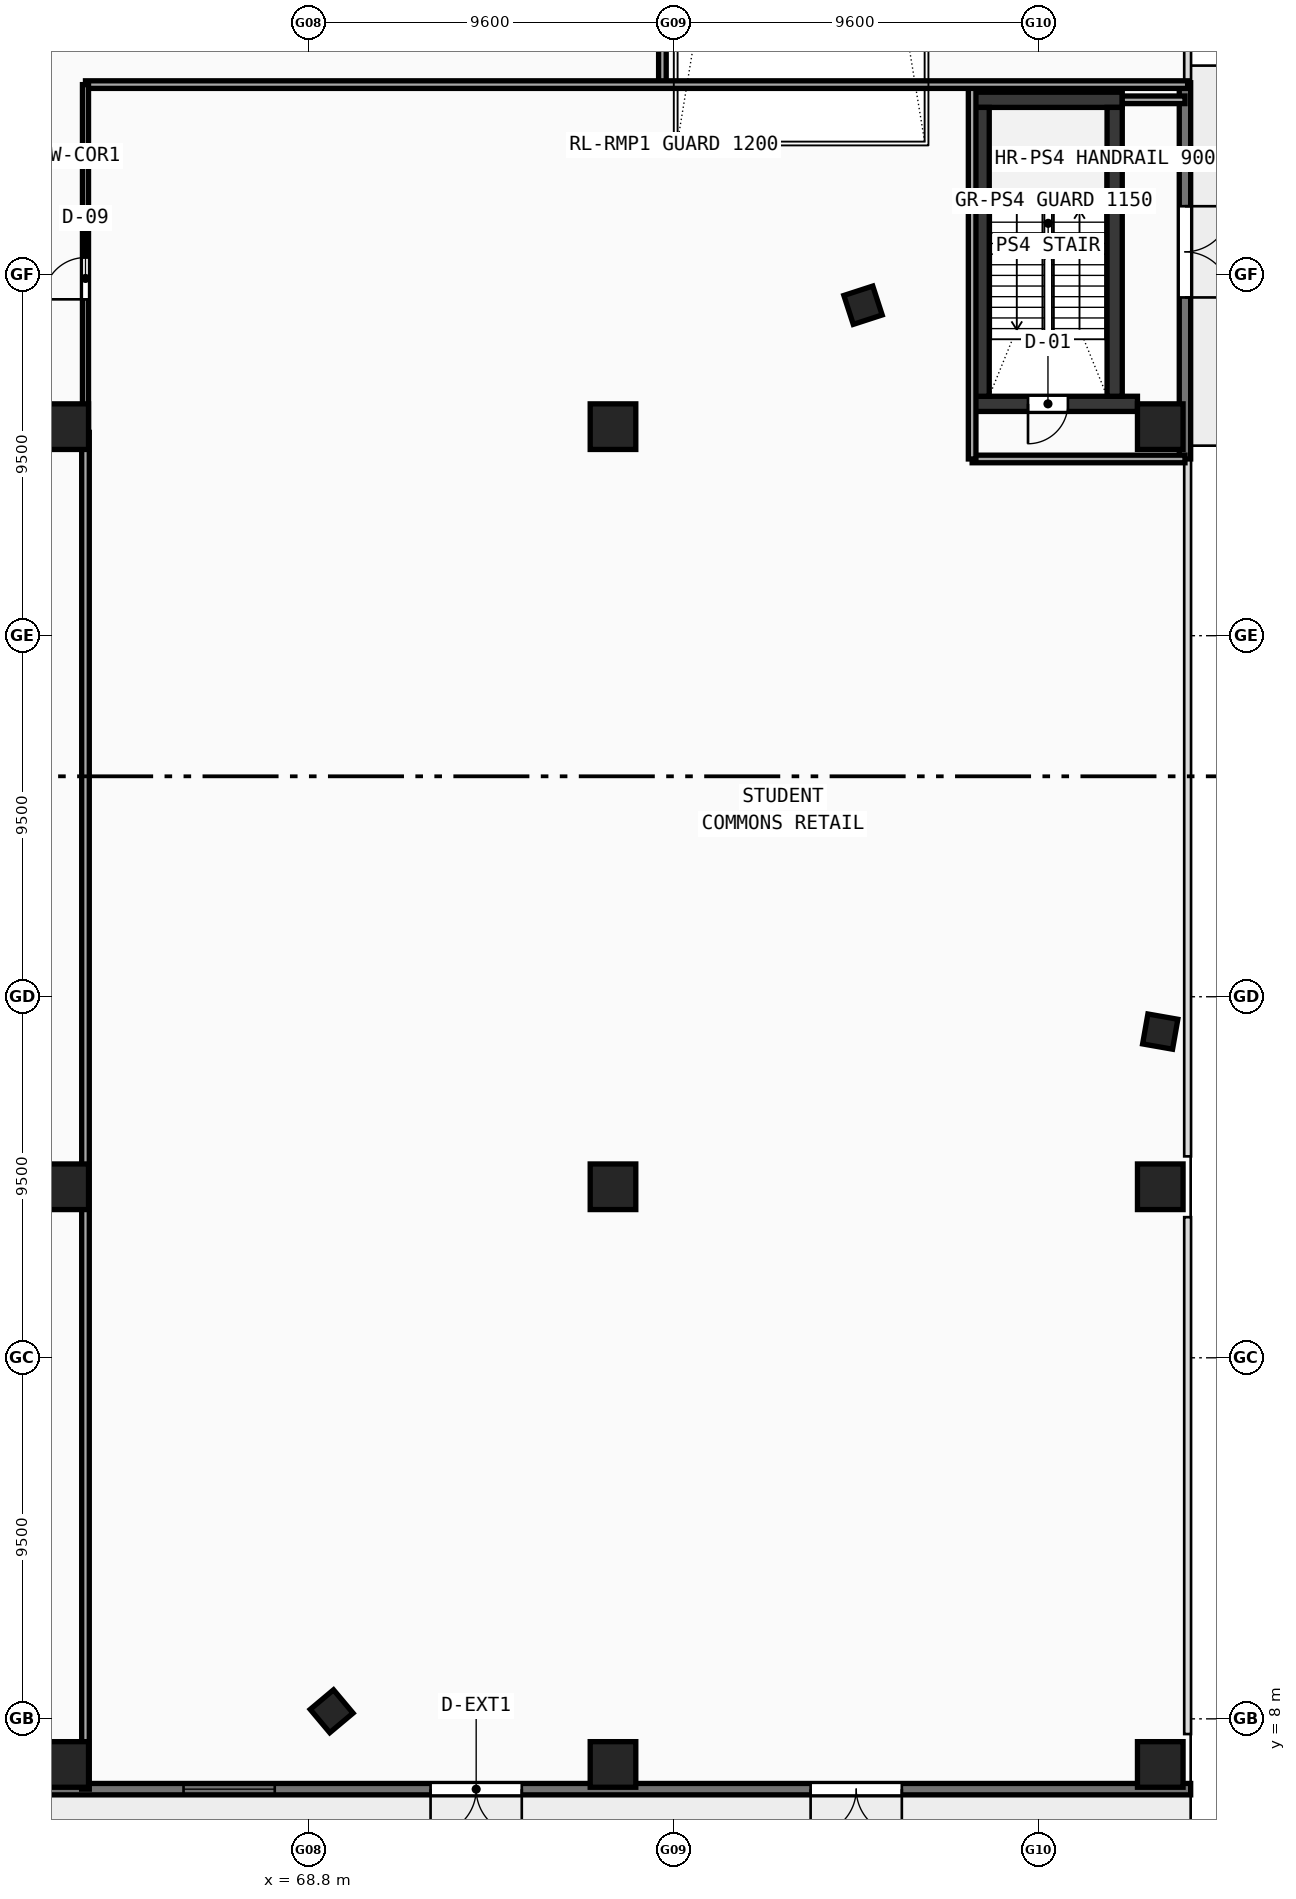
"""IFC4 building model, lengths in metres.
Left out: names, types, materials, properties, quantities, classifications, styles, units other than length and angle.
Written with IfcOpenShell. Run it as: python <this file> out.ifc"""

import sys

from ifc_helpers import new_model, si_unit, direction, frame, frame_2d, origin, origin_with_axes, origin_2d, place, context, subcontext, project, spatial, rectangle, hollow_rectangle, extrude, source, transform, mapped, element, fill, save


model = new_model("IFC4")
c1 = context("Model", 3, precision=1e-05, world=origin(), true_north=direction((0.0, 1.0)))
c2 = subcontext(c1, "Body", "Model", "MODEL_VIEW")
j1 = project(units=[si_unit("LENGTHUNIT", "METRE"), si_unit("PLANEANGLEUNIT", "RADIAN")], contexts=[c1])
p1 = place(None, origin())
s1 = spatial("IfcSite", under=j1, at=p1, CompositionType="ELEMENT")
p2 = place(p1, origin())
s2 = spatial("IfcBuilding", under=s1, at=p2, CompositionType="ELEMENT")
p3 = place(p2, origin())
s3 = spatial("IfcBuildingStorey", under=s2, at=p3, CompositionType="ELEMENT", Elevation=0.0)
p4 = place(p3, frame((86.3, 50.6, 0.0), z_axis=(0.0, 0.0, 1.0), x_axis=(1.0, 0.0, 0.0)))
e1 = element("IfcWall", 1, at=p4, inside=s3, PredefinedType="SHEAR", context=c2, shape_type="SweptSolid", body=[
    extrude(rectangle(XDim=3.9, YDim=0.4, at=frame_2d((1.95, 0.0))), origin(), (0.0, 0.0, 1.0), 4.52),
])
p5 = place(p3, frame((86.3, 42.6, 0.0), z_axis=(0.0, 0.0, 1.0), x_axis=(1.0, 0.0, 0.0)))
e2 = element("IfcWall", 2, at=p5, inside=s3, PredefinedType="SHEAR", context=c2, shape_type="SweptSolid", body=[
    extrude(rectangle(XDim=4.3, YDim=0.4, at=frame_2d((2.15, 0.0))), origin(), (0.0, 0.0, 1.0), 4.52),
])
p6 = place(p5, frame((1.42, 0.0, 0.0)))
e3 = element("IfcOpeningElement", 3, at=p6, cuts=e2, PredefinedType="OPENING", context=c2, shape_type="SweptSolid", body=[
    extrude(rectangle(XDim=1.05, YDim=2.1, at=frame_2d((0.525, 1.05))), frame((0.0, 0.21, 0.0), z_axis=(0.0, -1.0, 0.0), x_axis=(1.0, 0.0, 0.0)), (0.0, 0.0, 1.0), 0.42),
])
for number, where, z_axis, x_axis in (
    (4, (86.5, 42.8, 0.0), (0.0, 0.0, 1.0), (0.0, 1.0, 0.0)),
    (5, (90.0, 42.8, 0.0), (0.0, 0.0, 1.0), (0.0, 1.0, 0.0)),
):
    element("IfcWall", number, at=place(p3, frame(where, z_axis=z_axis, x_axis=x_axis)), inside=s3, PredefinedType="SHEAR", context=c2, shape_type="SweptSolid", body=[
        extrude(rectangle(XDim=7.6, YDim=0.4, at=frame_2d((3.8, 0.0))), origin(), (0.0, 0.0, 1.0), 4.52),
    ])
m1 = source(origin(), c2, "Body", "SweptSolid", [
    extrude(hollow_rectangle(XDim=1.2, YDim=1.2, WallThickness=0.05, at=origin_2d()), origin(), (0.0, 0.0, 1.0), 4.8),
])
for number, where, z_axis, x_axis in (
    (6, (62.4, 6.8, -0.28), (0.0, 0.0, 1.0), (1.0, 0.0, 0.0)),
    (7, (62.4, 22.0, -0.28), (0.0, 0.0, 1.0), (1.0, 0.0, 0.0)),
    (8, (62.4, 42.0, -0.28), (0.0, 0.0, 1.0), (1.0, 0.0, 0.0)),
    (9, (76.8, 6.8, -0.28), (0.0, 0.0, 1.0), (1.0, 0.0, 0.0)),
    (10, (76.8, 22.0, -0.28), (0.0, 0.0, 1.0), (1.0, 0.0, 0.0)),
    (11, (76.8, 42.0, -0.28), (0.0, 0.0, 1.0), (1.0, 0.0, 0.0)),
    (12, (91.2, 6.8, -0.28), (0.0, 0.0, 1.0), (1.0, 0.0, 0.0)),
    (13, (91.2, 22.0, -0.28), (0.0, 0.0, 1.0), (1.0, 0.0, 0.0)),
    (14, (91.2, 42.0, -0.28), (0.0, 0.0, 1.0), (1.0, 0.0, 0.0)),
):
    element("IfcColumn", number, at=place(p3, frame(where, z_axis=z_axis, x_axis=x_axis)), inside=s3, PredefinedType="COLUMN", context=c2, shape_type="MappedRepresentation", body=[
        mapped(m1, transform((0.0, 0.0, 0.0), scale=1.0)),
    ])
m2 = source(origin(), c2, "Body", "SweptSolid", [
    extrude(hollow_rectangle(XDim=0.8, YDim=0.8, WallThickness=0.032, at=origin_2d()), origin(), (0.0, 0.0, 1.0), 4.8),
])
for number, where, z_axis, x_axis in (
    (15, (69.397, 8.2, -0.28), (0.0, 0.0, 1.0), (0.766, 0.643, 0.0)),
    (16, (91.199, 26.083, -0.28), (0.0, 0.0, 1.0), (0.174, 0.985, 0.0)),
    (17, (83.379, 45.196, -0.28), (0.0, 0.0, 1.0), (-0.309, 0.951, 0.0)),
):
    element("IfcColumn", number, at=place(p3, frame(where, z_axis=z_axis, x_axis=x_axis)), inside=s3, PredefinedType="COLUMN", context=c2, shape_type="MappedRepresentation", body=[
        mapped(m2, transform((0.0, 0.0, 0.0), scale=1.0)),
    ])
p7 = place(p3, frame((4.0, 6.15, 0.0), z_axis=(0.0, 0.0, 1.0), x_axis=(1.0, 0.0, 0.0)))
e18 = element("IfcWall", 18, at=p7, inside=s3, PredefinedType="STANDARD", context=c2, shape_type="SweptSolid", body=[
    extrude(rectangle(XDim=88.0, YDim=0.3, at=frame_2d((44.0, 0.0))), origin(), (0.0, 0.0, 1.0), 4.52),
])
p8 = place(p7, frame((32.05, 0.0, 0.0)))
e19 = element("IfcOpeningElement", 19, at=p8, cuts=e18, PredefinedType="OPENING", context=c2, shape_type="SweptSolid", body=[
    extrude(rectangle(XDim=2.4, YDim=2.2, at=frame_2d((1.2, 1.1))), frame((0.0, 0.16, 0.0), z_axis=(0.0, -1.0, 0.0), x_axis=(1.0, 0.0, 0.0)), (0.0, 0.0, 1.0), 0.32),
])
p9 = place(p7, frame((53.55, 0.0, 0.0)))
e20 = element("IfcOpeningElement", 20, at=p9, cuts=e18, PredefinedType="OPENING", context=c2, shape_type="SweptSolid", body=[
    extrude(rectangle(XDim=2.4, YDim=2.2, at=frame_2d((1.2, 1.1))), frame((0.0, 0.16, 0.0), z_axis=(0.0, -1.0, 0.0), x_axis=(1.0, 0.0, 0.0)), (0.0, 0.0, 1.0), 0.32),
])
p10 = place(p7, frame((68.0, 0.0, 0.0)))
e21 = element("IfcOpeningElement", 21, at=p10, cuts=e18, PredefinedType="OPENING", context=c2, shape_type="SweptSolid", body=[
    extrude(rectangle(XDim=2.4, YDim=2.2, at=frame_2d((1.2, 1.1))), frame((0.0, 0.16, 0.0), z_axis=(0.0, -1.0, 0.0), x_axis=(1.0, 0.0, 0.0)), (0.0, 0.0, 1.0), 0.32),
])
p11 = place(p7, frame((78.0, 0.0, 0.0)))
e22 = element("IfcOpeningElement", 22, at=p11, cuts=e18, PredefinedType="OPENING", context=c2, shape_type="SweptSolid", body=[
    extrude(rectangle(XDim=2.4, YDim=2.2, at=frame_2d((1.2, 1.1))), frame((0.0, 0.16, 0.0), z_axis=(0.0, -1.0, 0.0), x_axis=(1.0, 0.0, 0.0)), (0.0, 0.0, 1.0), 0.32),
])
p12 = place(p7, frame((9.0, 0.0, 0.9)))
e23 = element("IfcOpeningElement", 23, at=p12, cuts=e18, PredefinedType="OPENING", context=c2, shape_type="SweptSolid", body=[
    extrude(rectangle(XDim=2.4, YDim=1.8, at=frame_2d((1.2, 0.9))), frame((0.0, 0.16, 0.0), z_axis=(0.0, -1.0, 0.0), x_axis=(1.0, 0.0, 0.0)), (0.0, 0.0, 1.0), 0.32),
])
p13 = place(p7, frame((20.5, 0.0, 0.9)))
e24 = element("IfcOpeningElement", 24, at=p13, cuts=e18, PredefinedType="OPENING", context=c2, shape_type="SweptSolid", body=[
    extrude(rectangle(XDim=2.4, YDim=1.8, at=frame_2d((1.2, 0.9))), frame((0.0, 0.16, 0.0), z_axis=(0.0, -1.0, 0.0), x_axis=(1.0, 0.0, 0.0)), (0.0, 0.0, 1.0), 0.32),
])
p14 = place(p7, frame((39.0, 0.0, 0.9)))
e25 = element("IfcOpeningElement", 25, at=p14, cuts=e18, PredefinedType="OPENING", context=c2, shape_type="SweptSolid", body=[
    extrude(rectangle(XDim=2.4, YDim=1.8, at=frame_2d((1.2, 0.9))), frame((0.0, 0.16, 0.0), z_axis=(0.0, -1.0, 0.0), x_axis=(1.0, 0.0, 0.0)), (0.0, 0.0, 1.0), 0.32),
])
p15 = place(p7, frame((48.0, 0.0, 0.9)))
e26 = element("IfcOpeningElement", 26, at=p15, cuts=e18, PredefinedType="OPENING", context=c2, shape_type="SweptSolid", body=[
    extrude(rectangle(XDim=2.4, YDim=1.8, at=frame_2d((1.2, 0.9))), frame((0.0, 0.16, 0.0), z_axis=(0.0, -1.0, 0.0), x_axis=(1.0, 0.0, 0.0)), (0.0, 0.0, 1.0), 0.32),
])
p16 = place(p7, frame((61.5, 0.0, 0.9)))
e27 = element("IfcOpeningElement", 27, at=p16, cuts=e18, PredefinedType="OPENING", context=c2, shape_type="SweptSolid", body=[
    extrude(rectangle(XDim=2.4, YDim=1.8, at=frame_2d((1.2, 0.9))), frame((0.0, 0.16, 0.0), z_axis=(0.0, -1.0, 0.0), x_axis=(1.0, 0.0, 0.0)), (0.0, 0.0, 1.0), 0.32),
])
p17 = place(p3, frame((91.85, 41.15, 0.0), z_axis=(0.0, 0.0, 1.0), x_axis=(0.0, 1.0, 0.0)))
e28 = element("IfcWall", 28, at=p17, inside=s3, PredefinedType="STANDARD", context=c2, shape_type="SweptSolid", body=[
    extrude(rectangle(XDim=9.9, YDim=0.3, at=frame_2d((4.95, 0.0))), origin(), (0.0, 0.0, 1.0), 4.52),
])
p18 = place(p17, frame((4.25, 0.0, 0.0)))
e29 = element("IfcOpeningElement", 29, at=p18, cuts=e28, PredefinedType="OPENING", context=c2, shape_type="SweptSolid", body=[
    extrude(rectangle(XDim=2.4, YDim=2.2, at=frame_2d((1.2, 1.1))), frame((0.0, 0.16, 0.0), z_axis=(0.0, -1.0, 0.0), x_axis=(1.0, 0.0, 0.0)), (0.0, 0.0, 1.0), 0.32),
])
p19 = place(p3, frame((86.25, 41.15, 0.0), z_axis=(0.0, 0.0, 1.0), x_axis=(1.0, 0.0, 0.0)))
e30 = element("IfcWall", 30, at=p19, inside=s3, PredefinedType="SOLIDWALL", context=c2, shape_type="SweptSolid", body=[
    extrude(rectangle(XDim=5.6, YDim=0.2, at=frame_2d((2.8, 0.0))), origin(), (0.0, 0.0, 1.0), 3.72),
])
p20 = place(p3, frame((86.25, 41.15, 0.0), z_axis=(0.0, 0.0, 1.0), x_axis=(0.0, 1.0, 0.0)))
e31 = element("IfcWall", 31, at=p20, inside=s3, PredefinedType="SOLIDWALL", context=c2, shape_type="SweptSolid", body=[
    extrude(rectangle(XDim=9.85, YDim=0.2, at=frame_2d((4.925, 0.0))), origin(), (0.0, 0.0, 1.0), 3.62),
])
p21 = place(p3, frame((90.2, 50.6, 0.0), z_axis=(0.0, 0.0, 1.0), x_axis=(1.0, 0.0, 0.0)))
e32 = element("IfcWall", 32, at=p21, inside=s3, PredefinedType="SOLIDWALL", context=c2, shape_type="SweptSolid", body=[
    extrude(rectangle(XDim=1.65, YDim=0.2, at=frame_2d((0.825, 0.0))), origin(), (0.0, 0.0, 1.0), 3.72),
])
p22 = place(p3, frame((62.92, 6.15, 0.0), z_axis=(0.0, 0.0, 1.0), x_axis=(0.0, 1.0, 0.0)))
e33 = element("IfcWall", 33, at=p22, inside=s3, PredefinedType="SOLIDWALL", context=c2, shape_type="SweptSolid", body=[
    extrude(rectangle(XDim=35.7, YDim=0.2, at=frame_2d((17.85, 0.0))), origin(), (0.0, 0.0, 1.0), 3.62),
])
p23 = place(p3, frame((56.95, 41.85, 0.0), z_axis=(0.0, 0.0, 1.0), x_axis=(1.0, 0.0, 0.0)))
e34 = element("IfcWall", 34, at=p23, inside=s3, PredefinedType="SOLIDWALL", context=c2, shape_type="SweptSolid", body=[
    extrude(rectangle(XDim=5.97, YDim=0.2, at=frame_2d((2.985, 0.0))), origin(), (0.0, 0.0, 1.0), 3.62),
])
p24 = place(p23, frame((2.4, 0.0, 0.0)))
e35 = element("IfcOpeningElement", 35, at=p24, cuts=e34, PredefinedType="OPENING", context=c2, shape_type="SweptSolid", body=[
    extrude(rectangle(XDim=1.05, YDim=2.1, at=frame_2d((0.525, 1.05))), frame((0.0, 0.11, 0.0), z_axis=(0.0, -1.0, 0.0), x_axis=(1.0, 0.0, 0.0)), (0.0, 0.0, 1.0), 0.22),
])
p25 = place(p3, frame((78.1, 51.0, 0.0), z_axis=(0.0, 0.0, 1.0), x_axis=(0.0, 1.0, 0.0)))
e36 = element("IfcWall", 36, at=p25, inside=s3, PredefinedType="SOLIDWALL", context=c2, shape_type="SweptSolid", body=[
    extrude(rectangle(XDim=38.85, YDim=0.2, at=frame_2d((19.425, 0.0))), origin(), (0.0, 0.0, 1.0), 3.62),
])
p26 = place(p3, frame((62.92, 51.0, 0.0), z_axis=(0.0, 0.0, 1.0), x_axis=(1.0, 0.0, 0.0)))
e37 = element("IfcWall", 37, at=p26, inside=s3, PredefinedType="SOLIDWALL", context=c2, shape_type="SweptSolid", body=[
    extrude(rectangle(XDim=29.0, YDim=0.2, at=frame_2d((14.5, 0.0))), origin(), (0.0, 0.0, 1.0), 3.62),
])
p27 = place(p3, frame((62.92, 41.85, 0.0), z_axis=(0.0, 0.0, 1.0), x_axis=(0.0, 1.0, 0.0)))
e38 = element("IfcWall", 38, at=p27, inside=s3, PredefinedType="PARTITIONING", context=c2, shape_type="SweptSolid", body=[
    extrude(rectangle(XDim=9.15, YDim=0.16, at=frame_2d((4.575, 0.0))), origin(), (0.0, 0.0, 1.0), 3.62),
])
p28 = place(p27, frame((3.5, 0.0, 0.0)))
e39 = element("IfcOpeningElement", 39, at=p28, cuts=e38, PredefinedType="OPENING", context=c2, shape_type="SweptSolid", body=[
    extrude(rectangle(XDim=1.1, YDim=2.15, at=frame_2d((0.55, 1.075))), frame((0.0, 0.09, 0.0), z_axis=(0.0, -1.0, 0.0), x_axis=(1.0, 0.0, 0.0)), (0.0, 0.0, 1.0), 0.18),
])
m3 = source(origin(), c2, "Body", "SweptSolid", [
    extrude(rectangle(XDim=2.4, YDim=2.2, at=frame_2d((1.2, 1.1))), frame((0.0, 0.025, 0.0), z_axis=(0.0, -1.0, 0.0), x_axis=(1.0, 0.0, 0.0)), (0.0, 0.0, 1.0), 0.05),
])
p29 = place(p10, frame((2.4, 0.0, 0.0), z_axis=(0.0, 0.0, 1.0), x_axis=(-1.0, 0.0, 0.0)))
e40 = element("IfcDoor", 40, at=p29, inside=s3, OperationType="DOUBLE_DOOR_SINGLE_SWING", PredefinedType="DOOR", context=c2, shape_type="MappedRepresentation", body=[
    mapped(m3, transform((0.0, 0.0, 0.0), scale=1.0)),
])
fill(e21, e40)
p30 = place(p11, frame((2.4, 0.0, 0.0), z_axis=(0.0, 0.0, 1.0), x_axis=(-1.0, 0.0, 0.0)))
e41 = element("IfcDoor", 41, at=p30, inside=s3, OperationType="DOUBLE_DOOR_SINGLE_SWING", PredefinedType="DOOR", context=c2, shape_type="MappedRepresentation", body=[
    mapped(m3, transform((0.0, 0.0, 0.0), scale=1.0)),
])
fill(e22, e41)
m4 = source(origin(), c2, "Body", "SweptSolid", [
    extrude(rectangle(XDim=2.4, YDim=1.8, at=frame_2d((1.2, 0.9))), frame((0.0, 0.03, 0.0), z_axis=(0.0, -1.0, 0.0), x_axis=(1.0, 0.0, 0.0)), (0.0, 0.0, 1.0), 0.06),
])
p31 = place(p16, origin_with_axes())
e42 = element("IfcWindow", 42, at=p31, inside=s3, PartitioningType="SINGLE_PANEL", PredefinedType="WINDOW", context=c2, shape_type="MappedRepresentation", body=[
    mapped(m4, transform((0.0, 0.0, 0.0), scale=1.0)),
])
fill(e27, e42)
p32 = place(p18, frame((2.4, 0.0, 0.0), z_axis=(0.0, 0.0, 1.0), x_axis=(-1.0, 0.0, 0.0)))
e43 = element("IfcDoor", 43, at=p32, inside=s3, OperationType="DOUBLE_DOOR_SINGLE_SWING", PredefinedType="DOOR", context=c2, shape_type="MappedRepresentation", body=[
    mapped(m3, transform((0.0, 0.0, 0.0), scale=1.0)),
])
fill(e29, e43)
m5 = source(origin(), c2, "Body", "SweptSolid", [
    extrude(rectangle(XDim=1.05, YDim=2.1, at=frame_2d((0.525, 1.05))), frame((0.0, 0.025, 0.0), z_axis=(0.0, -1.0, 0.0), x_axis=(1.0, 0.0, 0.0)), (0.0, 0.0, 1.0), 0.05),
])
p33 = place(p6, frame((1.05, 0.0, 0.0), z_axis=(0.0, 0.0, 1.0), x_axis=(-1.0, 0.0, 0.0)))
e44 = element("IfcDoor", 44, at=p33, inside=s3, OperationType="SINGLE_SWING_RIGHT", PredefinedType="DOOR", context=c2, shape_type="MappedRepresentation", body=[
    mapped(m5, transform((0.0, 0.0, 0.0), scale=1.0)),
])
fill(e3, e44)
m6 = source(origin(), c2, "Body", "SweptSolid", [
    extrude(rectangle(XDim=1.1, YDim=2.15, at=frame_2d((0.55, 1.075))), frame((0.0, 0.025, 0.0), z_axis=(0.0, -1.0, 0.0), x_axis=(1.0, 0.0, 0.0)), (0.0, 0.0, 1.0), 0.05),
])
p34 = place(p28, origin_with_axes())
e45 = element("IfcDoor", 45, at=p34, inside=s3, OperationType="SINGLE_SWING_LEFT", PredefinedType="DOOR", context=c2, shape_type="MappedRepresentation", body=[
    mapped(m6, transform((0.0, 0.0, 0.0), scale=1.0)),
])
fill(e39, e45)
save(model, sys.argv[1])
